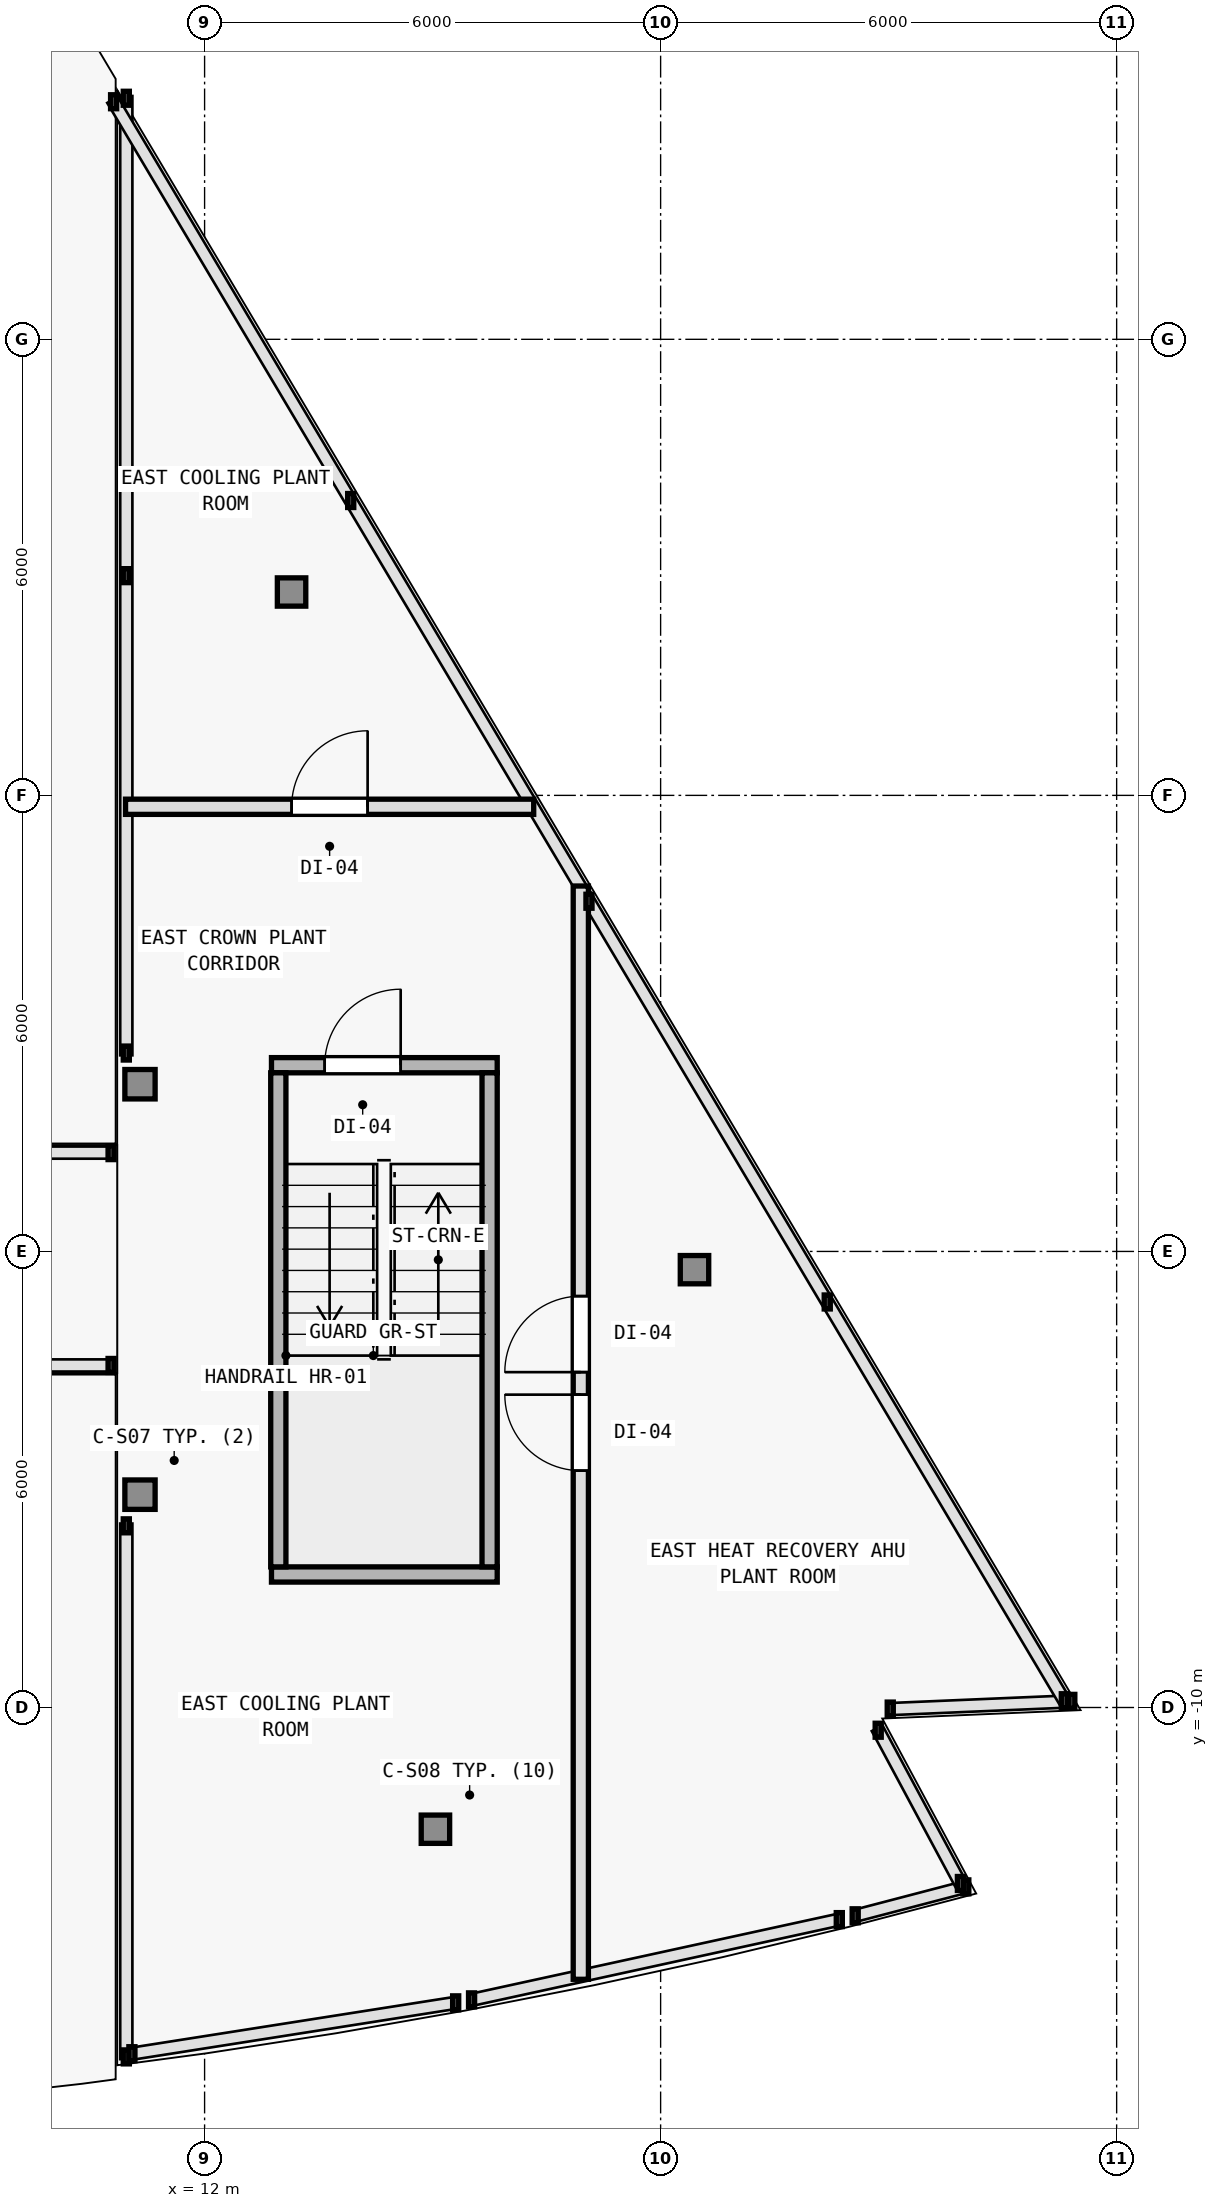
"""IFC4 building model, lengths in metres.
Left out: names, types, materials, properties, quantities, classifications, styles, units other than length and angle.
Written with IfcOpenShell. Run it as: python <this file> out.ifc"""

import sys

from ifc_helpers import new_model, si_unit, direction, frame, frame_2d, origin, origin_2d, place, context, subcontext, project, spatial, rectangle, i_section, extrude, element, fill, save


model = new_model("IFC4")
c1 = context("Model", 3, precision=1e-05, world=origin(), true_north=direction((0.0, 1.0)))
c2 = subcontext(c1, "Body", "Model", "MODEL_VIEW")
j1 = project(units=[si_unit("LENGTHUNIT", "METRE"), si_unit("PLANEANGLEUNIT", "RADIAN")], contexts=[c1])
p1 = place(None, origin())
s1 = spatial("IfcSite", under=j1, at=p1, CompositionType="ELEMENT")
p2 = place(p1, origin())
s2 = spatial("IfcBuilding", under=s1, at=p2, CompositionType="ELEMENT")
p3 = place(p2, frame((0.0, 0.0, 297.6)))
s3 = spatial("IfcBuildingStorey", under=s2, at=p3, CompositionType="ELEMENT", Elevation=297.6)
for number, where, z_axis, x_axis in (
    (1, (11.15, -7.2, 0.0), (0.0, 0.0, 1.0), (1.0, 0.0, 0.0)),
    (2, (11.15, -1.8, 0.0), (0.0, 0.0, 1.0), (1.0, 0.0, 0.0)),
):
    element("IfcColumn", number, at=place(p3, frame(where, z_axis=z_axis, x_axis=x_axis)), inside=s3, PredefinedType="COLUMN", context=c2, shape_type="SweptSolid", body=[
        extrude(i_section(OverallWidth=0.398, OverallDepth=0.387, WebThickness=0.013, FlangeThickness=0.022, FilletRadius=0.015, at=origin_2d()), origin(), (0.0, 0.0, 1.0), 3.6),
    ])
for number, where, z_axis, x_axis in (
    (3, (15.037, -11.602, 0.0), (0.0, 0.0, 1.0), (1.0, 0.0, 0.0)),
    (4, (18.446, -4.24, 0.0), (0.0, 0.0, 1.0), (1.0, 0.0, 0.0)),
    (5, (13.144, 4.676, 0.0), (0.0, 0.0, 1.0), (1.0, 0.0, 0.0)),
):
    element("IfcColumn", number, at=place(p3, frame(where, z_axis=z_axis, x_axis=x_axis)), inside=s3, PredefinedType="COLUMN", context=c2, shape_type="SweptSolid", body=[
        extrude(i_section(OverallWidth=0.374, OverallDepth=0.372, WebThickness=0.012, FlangeThickness=0.02, FilletRadius=0.015, at=origin_2d()), origin(), (0.0, 0.0, 1.0), 3.6),
    ])
p4 = place(p3, frame((12.88, -8.25, 0.0), z_axis=(0.0, 0.0, 1.0), x_axis=(1.0, 0.0, 0.0)))
e6 = element("IfcWall", 6, at=p4, inside=s3, PredefinedType="SOLIDWALL", context=c2, shape_type="SweptSolid", body=[
    extrude(rectangle(XDim=2.97, YDim=0.2, at=frame_2d((1.485, 0.0))), origin(), (0.0, 0.0, 1.0), 3.34),
])
p5 = place(p3, frame((12.88, -1.55, 0.0), z_axis=(0.0, 0.0, 1.0), x_axis=(1.0, 0.0, 0.0)))
e7 = element("IfcWall", 7, at=p5, inside=s3, PredefinedType="SOLIDWALL", context=c2, shape_type="SweptSolid", body=[
    extrude(rectangle(XDim=2.97, YDim=0.2, at=frame_2d((1.485, 0.0))), origin(), (0.0, 0.0, 1.0), 3.34),
])
p6 = place(p5, frame((0.7, 0.0, 0.0)))
e8 = element("IfcOpeningElement", 8, at=p6, cuts=e7, PredefinedType="OPENING", context=c2, shape_type="SweptSolid", body=[
    extrude(rectangle(XDim=1.0, YDim=2.15, at=frame_2d((0.5, 1.075))), frame((0.0, 0.11, 0.0), z_axis=(0.0, -1.0, 0.0), x_axis=(1.0, 0.0, 0.0)), (0.0, 0.0, 1.0), 0.22),
])
for number, where, z_axis, x_axis in (
    (9, (12.97, -8.15, 0.0), (0.0, 0.0, 1.0), (0.0, 1.0, 0.0)),
    (10, (15.75, -8.15, 0.0), (0.0, 0.0, 1.0), (0.0, 1.0, 0.0)),
):
    element("IfcWall", number, at=place(p3, frame(where, z_axis=z_axis, x_axis=x_axis)), inside=s3, PredefinedType="SOLIDWALL", context=c2, shape_type="SweptSolid", body=[
        extrude(rectangle(XDim=6.5, YDim=0.2, at=frame_2d((3.25, 0.0))), origin(), (0.0, 0.0, 1.0), 3.34),
    ])
p7 = place(p3, frame((16.95, -13.576, 0.0), z_axis=(0.0, 0.0, 1.0), x_axis=(0.0, 1.0, 0.0)))
e11 = element("IfcWall", 11, at=p7, inside=s3, PredefinedType="SOLIDWALL", context=c2, shape_type="SweptSolid", body=[
    extrude(rectangle(XDim=14.383, YDim=0.2, at=frame_2d((7.192, 0.0))), origin(), (0.0, 0.0, 1.0), 2.865),
])
p8 = place(p7, frame((6.692, 0.0, 0.0)))
e12 = element("IfcOpeningElement", 12, at=p8, cuts=e11, PredefinedType="OPENING", context=c2, shape_type="SweptSolid", body=[
    extrude(rectangle(XDim=1.0, YDim=2.15, at=frame_2d((0.5, 1.075))), frame((0.0, 0.11, 0.0), z_axis=(0.0, -1.0, 0.0), x_axis=(1.0, 0.0, 0.0)), (0.0, 0.0, 1.0), 0.22),
])
p9 = place(p7, frame((7.988, 0.0, 0.0)))
e13 = element("IfcOpeningElement", 13, at=p9, cuts=e11, PredefinedType="OPENING", context=c2, shape_type="SweptSolid", body=[
    extrude(rectangle(XDim=1.0, YDim=2.15, at=frame_2d((0.5, 1.075))), frame((0.0, 0.11, 0.0), z_axis=(0.0, -1.0, 0.0), x_axis=(1.0, 0.0, 0.0)), (0.0, 0.0, 1.0), 0.22),
])
p10 = place(p3, frame((10.96, 1.85, 0.0), z_axis=(0.0, 0.0, 1.0), x_axis=(1.0, 0.0, 0.0)))
e14 = element("IfcWall", 14, at=p10, inside=s3, PredefinedType="SOLIDWALL", context=c2, shape_type="SweptSolid", body=[
    extrude(rectangle(XDim=5.37, YDim=0.2, at=frame_2d((2.685, 0.0))), origin(), (0.0, 0.0, 1.0), 2.865),
])
p11 = place(p10, frame((2.185, 0.0, 0.0)))
e15 = element("IfcOpeningElement", 15, at=p11, cuts=e14, PredefinedType="OPENING", context=c2, shape_type="SweptSolid", body=[
    extrude(rectangle(XDim=1.0, YDim=2.15, at=frame_2d((0.5, 1.075))), frame((0.0, 0.11, 0.0), z_axis=(0.0, -1.0, 0.0), x_axis=(1.0, 0.0, 0.0)), (0.0, 0.0, 1.0), 0.22),
])
p12 = place(p6, origin())
e16 = element("IfcDoor", 16, at=p12, inside=s3, OperationType="SINGLE_SWING_RIGHT", PredefinedType="DOOR", context=c2, shape_type="SweptSolid", body=[
    extrude(rectangle(XDim=1.0, YDim=2.15, at=frame_2d((0.5, 1.075))), frame((0.0, 0.025, 0.0), z_axis=(0.0, -1.0, 0.0), x_axis=(1.0, 0.0, 0.0)), (0.0, 0.0, 1.0), 0.05),
])
fill(e8, e16)
p13 = place(p8, origin())
e17 = element("IfcDoor", 17, at=p13, inside=s3, OperationType="SINGLE_SWING_RIGHT", PredefinedType="DOOR", context=c2, shape_type="SweptSolid", body=[
    extrude(rectangle(XDim=1.0, YDim=2.15, at=frame_2d((0.5, 1.075))), frame((0.0, 0.025, 0.0), z_axis=(0.0, -1.0, 0.0), x_axis=(1.0, 0.0, 0.0)), (0.0, 0.0, 1.0), 0.05),
])
fill(e12, e17)
p14 = place(p9, origin())
e18 = element("IfcDoor", 18, at=p14, inside=s3, OperationType="SINGLE_SWING_LEFT", PredefinedType="DOOR", context=c2, shape_type="SweptSolid", body=[
    extrude(rectangle(XDim=1.0, YDim=2.15, at=frame_2d((0.5, 1.075))), frame((0.0, 0.025, 0.0), z_axis=(0.0, -1.0, 0.0), x_axis=(1.0, 0.0, 0.0)), (0.0, 0.0, 1.0), 0.05),
])
fill(e13, e18)
p15 = place(p11, origin())
e19 = element("IfcDoor", 19, at=p15, inside=s3, OperationType="SINGLE_SWING_RIGHT", PredefinedType="DOOR", context=c2, shape_type="SweptSolid", body=[
    extrude(rectangle(XDim=1.0, YDim=2.15, at=frame_2d((0.5, 1.075))), frame((0.0, 0.025, 0.0), z_axis=(0.0, -1.0, 0.0), x_axis=(1.0, 0.0, 0.0)), (0.0, 0.0, 1.0), 0.05),
])
fill(e15, e19)
save(model, sys.argv[1])
